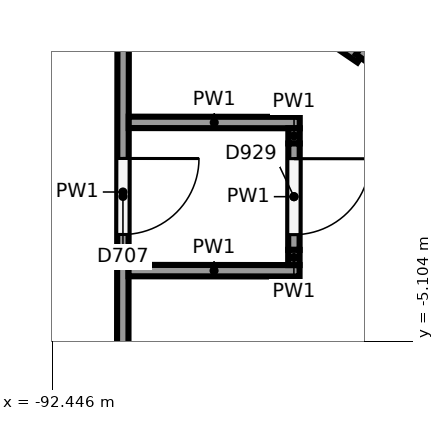
"""IFC4 building model, lengths in metres.
Left out: names, types, materials, properties, quantities, classifications, styles, units other than length and angle.
Written with IfcOpenShell. Run it as: python <this file> out.ifc"""

import sys

from ifc_helpers import new_model, si_unit, direction, frame, frame_2d, origin, place, context, subcontext, project, spatial, rectangle, extrude, element, fill, save


model = new_model("IFC4")
c1 = context("Model", 3, precision=1e-05, world=origin(), true_north=direction((0.0, 1.0)))
c2 = subcontext(c1, "Body", "Model", "MODEL_VIEW")
j1 = project(units=[si_unit("LENGTHUNIT", "METRE"), si_unit("PLANEANGLEUNIT", "RADIAN")], contexts=[c1])
p1 = place(None, origin())
s1 = spatial("IfcSite", under=j1, at=p1, CompositionType="ELEMENT")
p2 = place(p1, origin())
s2 = spatial("IfcBuilding", under=s1, at=p2, CompositionType="ELEMENT")
p3 = place(p2, frame((0.0, 0.0, 12.0)))
s3 = spatial("IfcBuildingStorey", under=s2, at=p3, CompositionType="ELEMENT", Elevation=12.0)
p4 = place(p3, frame((-91.512, -0.75, 0.0), z_axis=(0.0, 0.0, 1.0), x_axis=(-0.001174067593, -0.999999310782, 0.0)))
e1 = element("IfcWall", 1, at=p4, inside=s3, PredefinedType="PARTITIONING", context=c2, shape_type="SweptSolid", body=[
    extrude(rectangle(XDim=4.783, YDim=0.15, at=frame_2d((2.391, 0.0))), origin(), (0.0, 0.0, 1.0), 5.65),
])
p5 = place(p4, frame((1.95, 0.0, 0.0)))
e2 = element("IfcOpeningElement", 2, at=p5, cuts=e1, PredefinedType="OPENING", context=c2, shape_type="SweptSolid", body=[
    extrude(rectangle(XDim=1.0, YDim=2.1, at=frame_2d((0.5, 1.05))), frame((0.0, 0.085, 0.0), z_axis=(0.0, -1.0, 0.0), x_axis=(1.0, 0.0, 0.0)), (0.0, 0.0, 1.0), 0.17),
])
p6 = place(p3, frame((-89.32, -0.74, 0.0), z_axis=(0.0, 0.0, 1.0), x_axis=(0.826749248939, -0.562570599462, 0.0)))
e3 = element("IfcWall", 3, at=p6, inside=s3, PredefinedType="PARTITIONING", context=c2, shape_type="SweptSolid", body=[
    extrude(rectangle(XDim=1.127, YDim=0.15, at=frame_2d((0.564, 0.0))), origin(), (0.0, 0.0, 1.0), 5.65),
])
p7 = place(p3, frame((-88.388, -1.374, 0.0), z_axis=(0.0, 0.0, 1.0), x_axis=(0.5761634622, 0.817334487726, 0.0)))
e4 = element("IfcWall", 4, at=p7, inside=s3, PredefinedType="PARTITIONING", context=c2, shape_type="SweptSolid", body=[
    extrude(rectangle(XDim=0.83, YDim=0.15, at=frame_2d((0.415, 0.0))), origin(), (0.0, 0.0, 1.0), 5.65),
])
for number, where, z_axis, x_axis in (
    (5, (-91.438, -2.225, 0.0), (0.0, 0.0, 1.0), (1.0, -0.001, 0.0)),
    (6, (-91.441, -4.175, 0.0), (0.0, 0.0, 1.0), (1.0, -0.001, 0.0)),
):
    element("IfcWall", number, at=place(p3, frame(where, z_axis=z_axis, x_axis=x_axis)), inside=s3, PredefinedType="PARTITIONING", context=c2, shape_type="SweptSolid", body=[
        extrude(rectangle(XDim=2.25, YDim=0.15, at=frame_2d((1.125, 0.0))), origin(), (0.0, 0.0, 1.0), 5.65),
    ])
p8 = place(p3, frame((-89.263, -2.303, 0.0), z_axis=(0.0, 0.0, 1.0), x_axis=(-0.001221000311, -0.999999254579, 0.0)))
e7 = element("IfcWall", 7, at=p8, inside=s3, PredefinedType="PARTITIONING", context=c2, shape_type="SweptSolid", body=[
    extrude(rectangle(XDim=0.2, YDim=0.15, at=frame_2d((0.1, 0.0))), origin(), (0.0, 0.0, 1.0), 5.65),
])
p9 = place(p3, frame((-89.264, -2.503, 0.0), z_axis=(0.0, 0.0, 1.0), x_axis=(-0.001220787371, -0.999999254839, 0.0)))
e8 = element("IfcWall", 8, at=p9, inside=s3, PredefinedType="PARTITIONING", context=c2, shape_type="SweptSolid", body=[
    extrude(rectangle(XDim=1.4, YDim=0.15, at=frame_2d((0.7, 0.0))), origin(), (0.0, 0.0, 1.0), 5.65),
])
p10 = place(p9, frame((0.2, 0.0, 0.0)))
e9 = element("IfcOpeningElement", 9, at=p10, cuts=e8, PredefinedType="OPENING", context=c2, shape_type="SweptSolid", body=[
    extrude(rectangle(XDim=1.0, YDim=2.1, at=frame_2d((0.5, 1.05))), frame((0.0, 0.085, 0.0), z_axis=(0.0, -1.0, 0.0), x_axis=(1.0, 0.0, 0.0)), (0.0, 0.0, 1.0), 0.17),
])
p11 = place(p3, frame((-89.265, -3.903, 0.0), z_axis=(0.0, 0.0, 1.0), x_axis=(-0.001219511288, -0.999999256396, 0.0)))
e10 = element("IfcWall", 10, at=p11, inside=s3, PredefinedType="PARTITIONING", context=c2, shape_type="SweptSolid", body=[
    extrude(rectangle(XDim=0.2, YDim=0.15, at=frame_2d((0.1, 0.0))), origin(), (0.0, 0.0, 1.0), 5.65),
])
p12 = place(p5, origin())
e11 = element("IfcDoor", 11, at=p12, inside=s3, OperationType="SINGLE_SWING_LEFT", PredefinedType="DOOR", context=c2, shape_type="SweptSolid", body=[
    extrude(rectangle(XDim=1.0, YDim=2.1, at=frame_2d((0.5, 1.05))), frame((0.0, 0.025, 0.0), z_axis=(0.0, -1.0, 0.0), x_axis=(1.0, 0.0, 0.0)), (0.0, 0.0, 1.0), 0.05),
])
fill(e2, e11)
p13 = place(p10, origin())
e12 = element("IfcDoor", 12, at=p13, inside=s3, OperationType="SINGLE_SWING_LEFT", PredefinedType="DOOR", context=c2, shape_type="SweptSolid", body=[
    extrude(rectangle(XDim=1.0, YDim=2.1, at=frame_2d((0.5, 1.05))), frame((0.0, 0.025, 0.0), z_axis=(0.0, -1.0, 0.0), x_axis=(1.0, 0.0, 0.0)), (0.0, 0.0, 1.0), 0.05),
])
fill(e9, e12)
save(model, sys.argv[1])
